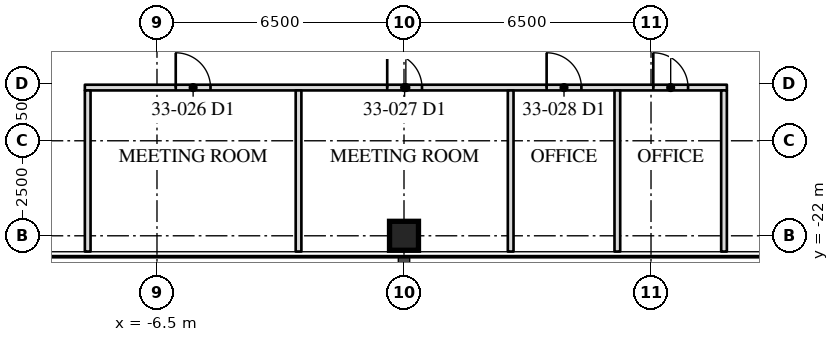
"""IFC4 building model, lengths in metres.
Left out: names, types, materials, properties, quantities, classifications, styles, units other than length and angle.
Written with IfcOpenShell. Run it as: python <this file> out.ifc"""

import sys

from ifc_helpers import new_model, si_unit, direction, frame, frame_2d, origin, origin_2d, place, context, subcontext, project, spatial, rectangle, hollow_rectangle, extrude, element, fill, save


model = new_model("IFC4")
c1 = context("Model", 3, precision=1e-05, world=origin(), true_north=direction((0.0, 1.0)))
c2 = subcontext(c1, "Body", "Model", "MODEL_VIEW")
j1 = project(units=[si_unit("LENGTHUNIT", "METRE"), si_unit("PLANEANGLEUNIT", "RADIAN")], contexts=[c1])
p1 = place(None, origin())
s1 = spatial("IfcSite", under=j1, at=p1, CompositionType="ELEMENT")
p2 = place(p1, origin())
s2 = spatial("IfcBuilding", under=s1, at=p2, CompositionType="ELEMENT")
p3 = place(p2, frame((0.0, 0.0, 141.8)))
s3 = spatial("IfcBuildingStorey", under=s2, at=p3, CompositionType="ELEMENT", Elevation=141.8)
p4 = place(p3, frame((0.0, -22.0, 0.0), z_axis=(0.0, 0.0, 1.0), x_axis=(1.0, 0.0, 0.0)))
e1 = element("IfcColumn", 1, at=p4, inside=s3, PredefinedType="COLUMN", context=c2, shape_type="SweptSolid", body=[
    extrude(hollow_rectangle(XDim=0.762, YDim=0.762, WallThickness=0.076, at=origin_2d()), origin(), (0.0, 0.0, 1.0), 4.1),
])
p5 = place(p3, frame((-8.398, -18.1, 0.0), z_axis=(0.0, 0.0, 1.0), x_axis=(1.0, 0.0, 0.0)))
e2 = element("IfcWall", 2, at=p5, inside=s3, PredefinedType="PARTITIONING", context=c2, shape_type="SweptSolid", body=[
    extrude(rectangle(XDim=16.894, YDim=0.15, at=frame_2d((8.447, 0.0))), origin(), (0.0, 0.0, 1.0), 3.91),
])
p6 = place(p5, frame((2.392, 0.0, 0.0)))
e3 = element("IfcOpeningElement", 3, at=p6, cuts=e2, PredefinedType="OPENING", context=c2, shape_type="SweptSolid", body=[
    extrude(rectangle(XDim=0.915, YDim=2.134, at=frame_2d((0.458, 1.067))), frame((0.0, 0.085, 0.0), z_axis=(0.0, -1.0, 0.0), x_axis=(1.0, 0.0, 0.0)), (0.0, 0.0, 1.0), 0.17),
])
p7 = place(p5, frame((7.957, 0.0, 0.0)))
e4 = element("IfcOpeningElement", 4, at=p7, cuts=e2, PredefinedType="OPENING", context=c2, shape_type="SweptSolid", body=[
    extrude(rectangle(XDim=0.915, YDim=2.134, at=frame_2d((0.458, 1.067))), frame((0.0, 0.085, 0.0), z_axis=(0.0, -1.0, 0.0), x_axis=(1.0, 0.0, 0.0)), (0.0, 0.0, 1.0), 0.17),
])
p8 = place(p5, frame((12.151, 0.0, 0.0)))
e5 = element("IfcOpeningElement", 5, at=p8, cuts=e2, PredefinedType="OPENING", context=c2, shape_type="SweptSolid", body=[
    extrude(rectangle(XDim=0.915, YDim=2.134, at=frame_2d((0.458, 1.067))), frame((0.0, 0.085, 0.0), z_axis=(0.0, -1.0, 0.0), x_axis=(1.0, 0.0, 0.0)), (0.0, 0.0, 1.0), 0.17),
])
p9 = place(p5, frame((14.958, 0.0, 0.0)))
e6 = element("IfcOpeningElement", 6, at=p9, cuts=e2, PredefinedType="OPENING", context=c2, shape_type="SweptSolid", body=[
    extrude(rectangle(XDim=0.915, YDim=2.134, at=frame_2d((0.458, 1.067))), frame((0.0, 0.085, 0.0), z_axis=(0.0, -1.0, 0.0), x_axis=(1.0, 0.0, 0.0)), (0.0, 0.0, 1.0), 0.17),
])
for number, where, z_axis, x_axis in (
    (7, (-8.323, -18.175, 0.0), (0.0, 0.0, 1.0), (0.0, -1.0, 0.0)),
    (8, (-2.775, -18.175, 0.0), (0.0, 0.0, 1.0), (0.0, -1.0, 0.0)),
    (9, (2.807, -18.175, 0.0), (0.0, 0.0, 1.0), (0.0, -1.0, 0.0)),
    (10, (5.614, -18.175, 0.0), (0.0, 0.0, 1.0), (0.0, -1.0, 0.0)),
    (11, (8.421, -18.175, 0.0), (0.0, 0.0, 1.0), (0.0, -1.0, 0.0)),
):
    element("IfcWall", number, at=place(p3, frame(where, z_axis=z_axis, x_axis=x_axis)), inside=s3, PredefinedType="PARTITIONING", context=c2, shape_type="SweptSolid", body=[
        extrude(rectangle(XDim=4.24, YDim=0.15, at=frame_2d((2.12, 0.0))), origin(), (0.0, 0.0, 1.0), 3.91),
    ])
p10 = place(p6, origin())
e12 = element("IfcDoor", 12, at=p10, inside=s3, OperationType="SINGLE_SWING_LEFT", PredefinedType="DOOR", context=c2, shape_type="SweptSolid", body=[
    extrude(rectangle(XDim=0.915, YDim=2.134, at=frame_2d((0.458, 1.067))), frame((0.0, 0.025, 0.0), z_axis=(0.0, -1.0, 0.0), x_axis=(1.0, 0.0, 0.0)), (0.0, 0.0, 1.0), 0.05),
])
fill(e3, e12)
p11 = place(p7, origin())
e13 = element("IfcDoor", 13, at=p11, inside=s3, OperationType="SINGLE_SWING_LEFT", PredefinedType="DOOR", context=c2, shape_type="SweptSolid", body=[
    extrude(rectangle(XDim=0.915, YDim=2.134, at=frame_2d((0.458, 1.067))), frame((0.0, 0.025, 0.0), z_axis=(0.0, -1.0, 0.0), x_axis=(1.0, 0.0, 0.0)), (0.0, 0.0, 1.0), 0.05),
])
fill(e4, e13)
p12 = place(p8, origin())
e14 = element("IfcDoor", 14, at=p12, inside=s3, OperationType="SINGLE_SWING_LEFT", PredefinedType="DOOR", context=c2, shape_type="SweptSolid", body=[
    extrude(rectangle(XDim=0.915, YDim=2.134, at=frame_2d((0.458, 1.067))), frame((0.0, 0.025, 0.0), z_axis=(0.0, -1.0, 0.0), x_axis=(1.0, 0.0, 0.0)), (0.0, 0.0, 1.0), 0.05),
])
fill(e5, e14)
p13 = place(p9, origin())
e15 = element("IfcDoor", 15, at=p13, inside=s3, OperationType="SINGLE_SWING_LEFT", PredefinedType="DOOR", context=c2, shape_type="SweptSolid", body=[
    extrude(rectangle(XDim=0.915, YDim=2.134, at=frame_2d((0.458, 1.067))), frame((0.0, 0.025, 0.0), z_axis=(0.0, -1.0, 0.0), x_axis=(1.0, 0.0, 0.0)), (0.0, 0.0, 1.0), 0.05),
])
fill(e6, e15)
save(model, sys.argv[1])
